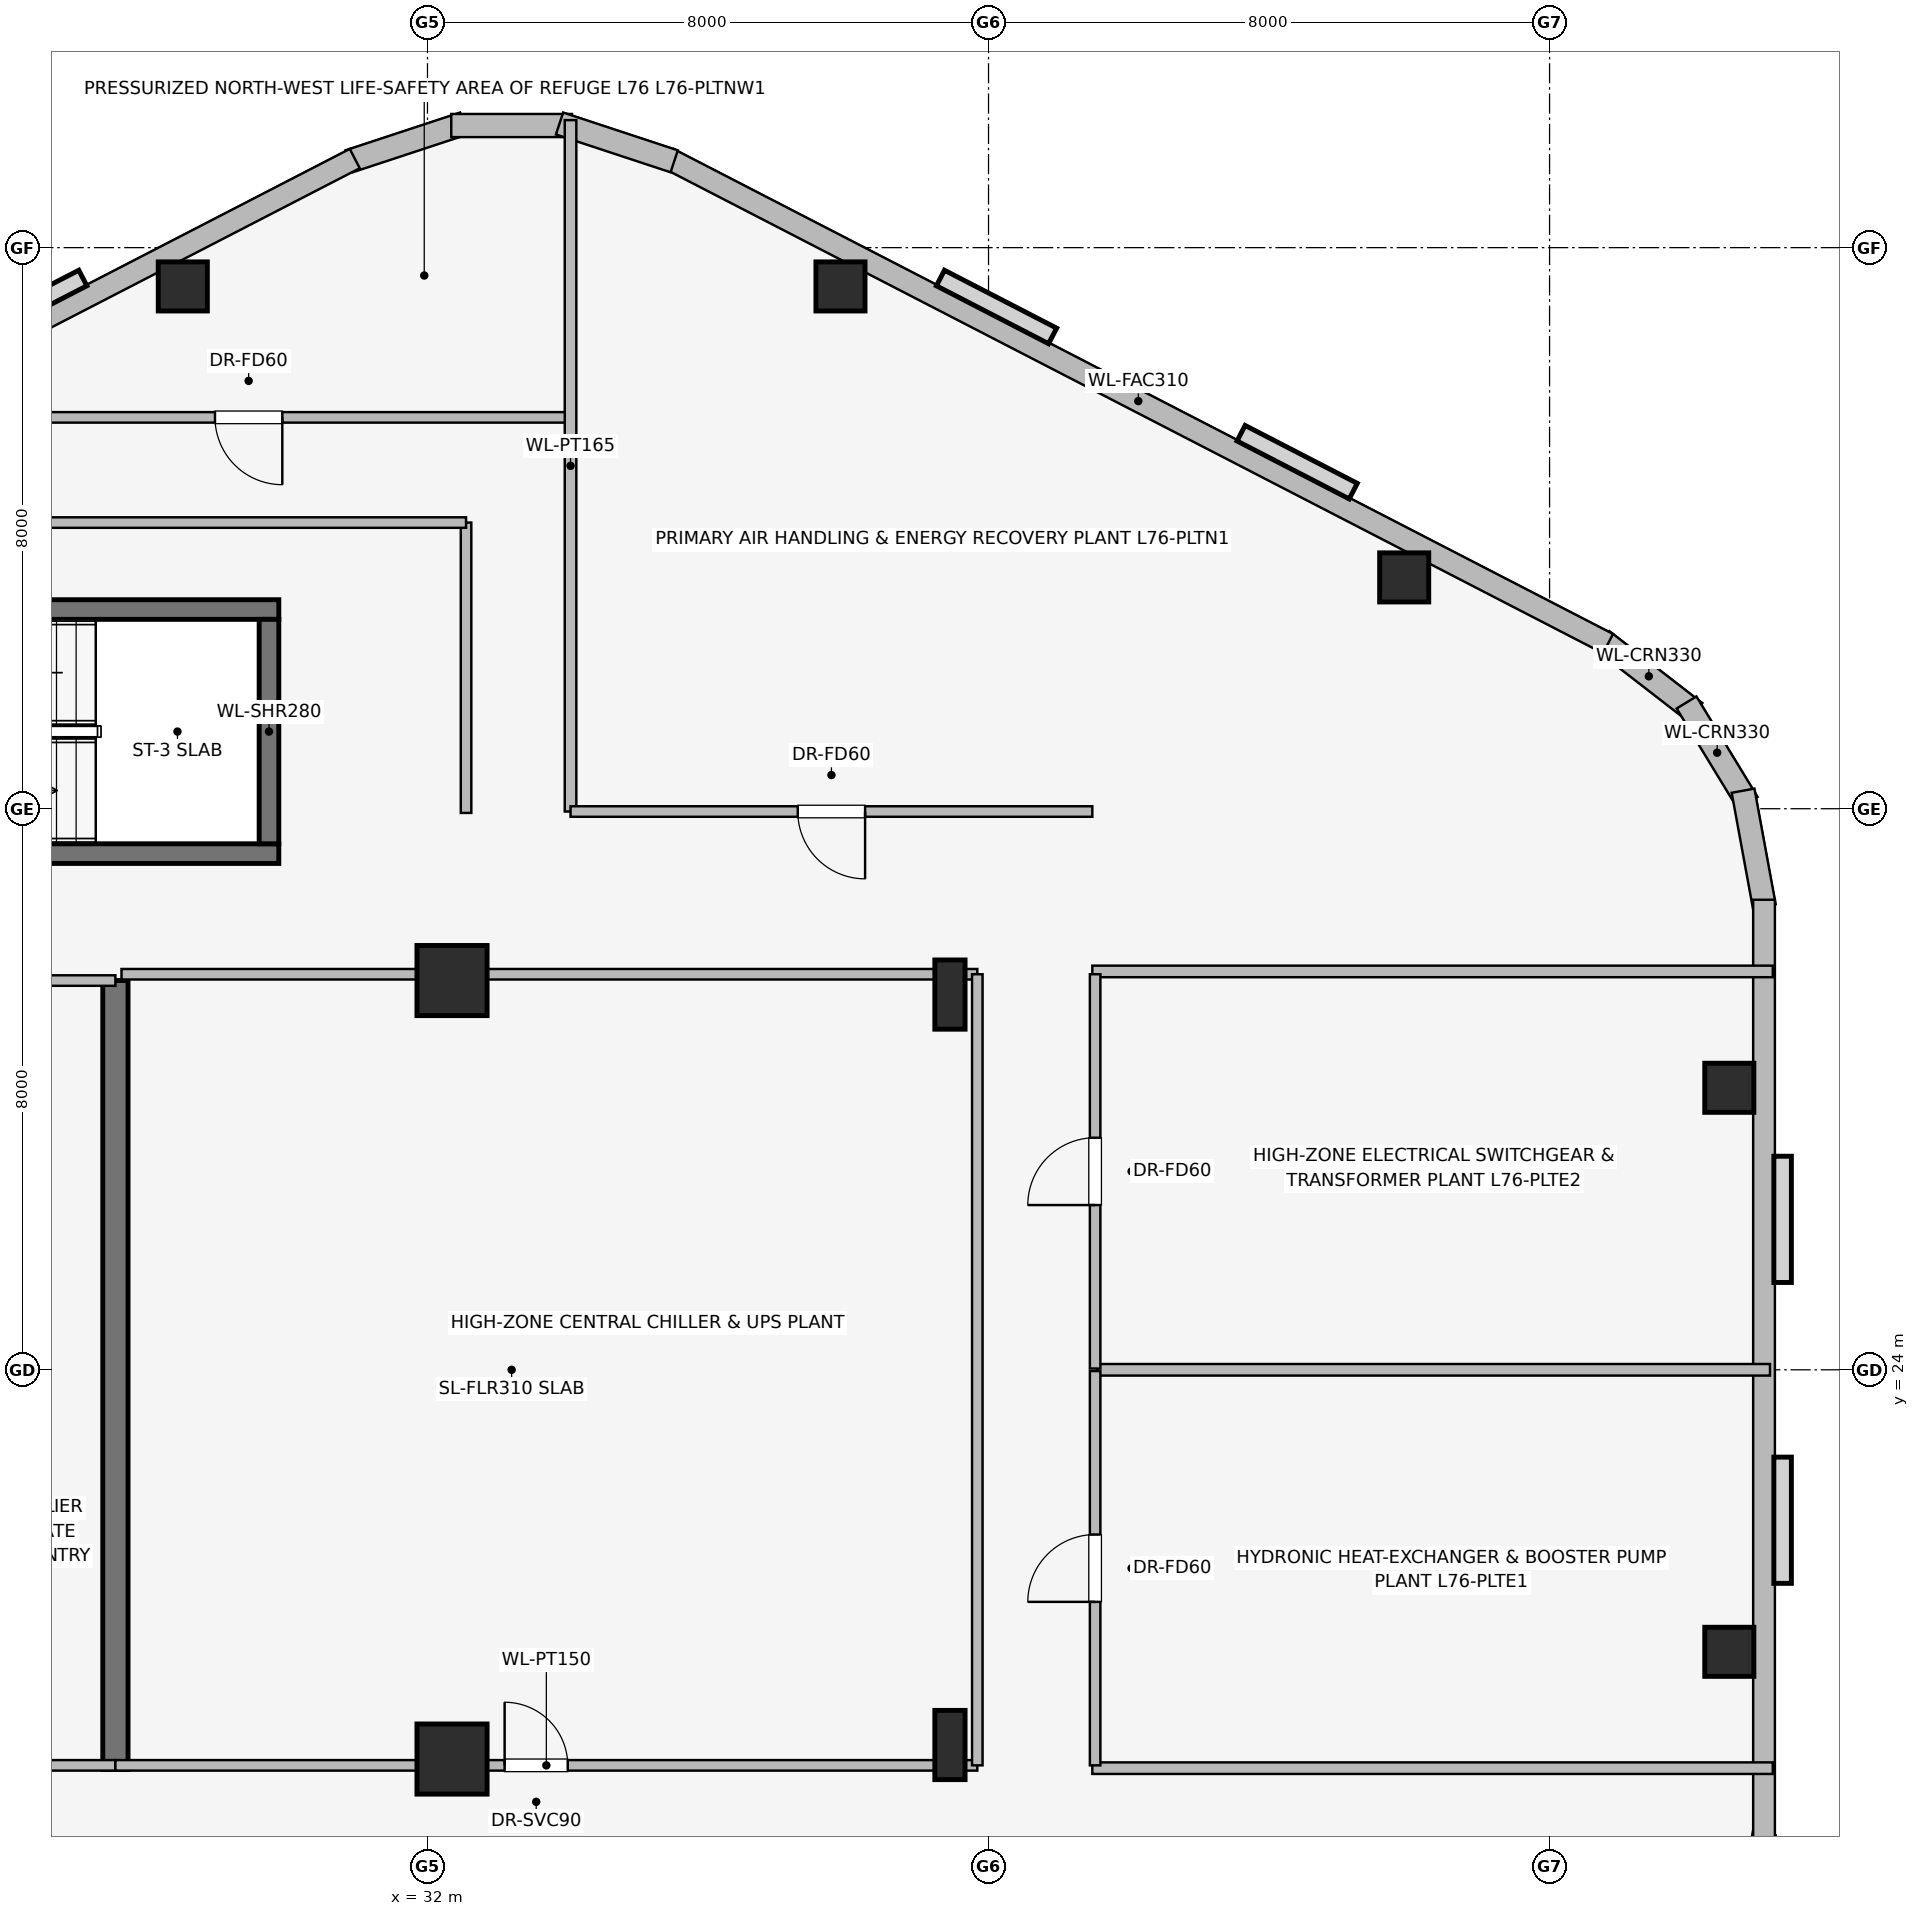
"""IFC4 building model, lengths in metres.
Left out: names, types, materials, properties, quantities, classifications, styles, units other than length and angle.
Written with IfcOpenShell. Run it as: python <this file> out.ifc"""

import sys

from ifc_helpers import new_model, si_unit, direction, frame, frame_2d, origin, origin_2d, place, context, subcontext, project, spatial, rectangle, i_section, extrude, element, fill, save


model = new_model("IFC4")
c1 = context("Model", 3, precision=1e-05, world=origin(), true_north=direction((0.0, 1.0)))
c2 = subcontext(c1, "Body", "Model", "MODEL_VIEW")
j1 = project(units=[si_unit("LENGTHUNIT", "METRE"), si_unit("PLANEANGLEUNIT", "RADIAN")], contexts=[c1])
p1 = place(None, origin())
s1 = spatial("IfcSite", under=j1, at=p1, CompositionType="ELEMENT")
p2 = place(p1, origin())
s2 = spatial("IfcBuilding", under=s1, at=p2, CompositionType="ELEMENT")
p3 = place(p2, frame((0.0, 0.0, 279.9)))
s3 = spatial("IfcBuildingStorey", under=s2, at=p3, CompositionType="ELEMENT", Elevation=279.9)
p4 = place(p3, frame((27.55, 29.55, 0.0), z_axis=(0.0, 0.0, 1.0), x_axis=(0.0, -1.0, 0.0)))
e1 = element("IfcWall", 1, at=p4, inside=s3, PredefinedType="SHEAR", context=c2, shape_type="SweptSolid", body=[
    extrude(rectangle(XDim=11.25, YDim=0.36, at=frame_2d((5.625, 0.0))), origin(), (0.0, 0.0, 1.0), 5.2),
])
p5 = place(p3, frame((21.52, 31.36, 0.0), z_axis=(0.0, 0.0, 1.0), x_axis=(1.0, 0.0, 0.0)))
e2 = element("IfcWall", 2, at=p5, inside=s3, PredefinedType="SHEAR", context=c2, shape_type="SweptSolid", body=[
    extrude(rectangle(XDim=8.36, YDim=0.28, at=frame_2d((4.18, 0.0))), origin(), (0.0, 0.0, 1.0), 5.2),
])
p6 = place(p5, frame((0.45, 0.0, 0.0)))
e3 = element("IfcOpeningElement", 3, at=p6, cuts=e2, PredefinedType="OPENING", context=c2, shape_type="SweptSolid", body=[
    extrude(rectangle(XDim=1.05, YDim=2.0, at=frame_2d((0.525, 1.0))), frame((0.0, 0.15, 0.0), z_axis=(0.0, -1.0, 0.0), x_axis=(1.0, 0.0, 0.0)), (0.0, 0.0, 1.0), 0.3),
])
p7 = place(p3, frame((29.88, 34.84, 0.0), z_axis=(0.0, 0.0, 1.0), x_axis=(-1.0, 0.0, 0.0)))
e4 = element("IfcWall", 4, at=p7, inside=s3, PredefinedType="SHEAR", context=c2, shape_type="SweptSolid", body=[
    extrude(rectangle(XDim=8.36, YDim=0.28, at=frame_2d((4.18, 0.0))), origin(), (0.0, 0.0, 1.0), 5.2),
])
p8 = place(p3, frame((29.74, 31.5, 0.0), z_axis=(0.0, 0.0, 1.0), x_axis=(0.0, 1.0, 0.0)))
e5 = element("IfcWall", 5, at=p8, inside=s3, PredefinedType="SHEAR", context=c2, shape_type="SweptSolid", body=[
    extrude(rectangle(XDim=3.2, YDim=0.28, at=frame_2d((1.6, 0.0))), origin(), (0.0, 0.0, 1.0), 5.2),
])
for number, where, z_axis, x_axis in (
    (6, (32.35, 18.45, 0.0), (0.0, 0.0, 1.0), (1.0, 0.0, 0.0)),
    (7, (32.35, 29.55, 0.0), (0.0, 0.0, 1.0), (1.0, 0.0, 0.0)),
):
    element("IfcColumn", number, at=place(p3, frame(where, z_axis=z_axis, x_axis=x_axis)), inside=s3, PredefinedType="COLUMN", context=c2, shape_type="SweptSolid", body=[
        extrude(rectangle(XDim=1.0, YDim=1.0, at=origin_2d()), origin(), (0.0, 0.0, 1.0), 5.2),
    ])
for number, where, z_axis, x_axis in (
    (8, (45.927, 35.298, 0.0), (0.0, 0.0, 1.0), (1.0, 0.0, 0.0)),
    (9, (37.889, 39.447, 0.0), (0.0, 0.0, 1.0), (1.0, 0.0, 0.0)),
    (10, (28.511, 39.447, 0.0), (0.0, 0.0, 1.0), (1.0, 0.0, 0.0)),
    (11, (50.563, 19.979, 0.0), (0.0, 0.0, 1.0), (1.0, 0.0, 0.0)),
    (12, (50.563, 28.021, 0.0), (0.0, 0.0, 1.0), (1.0, 0.0, 0.0)),
):
    element("IfcColumn", number, at=place(p3, frame(where, z_axis=z_axis, x_axis=x_axis)), inside=s3, PredefinedType="COLUMN", context=c2, shape_type="SweptSolid", body=[
        extrude(rectangle(XDim=0.7, YDim=0.7, at=origin_2d()), origin(), (0.0, 0.0, 1.0), 5.2),
    ])
for number, where, z_axis, x_axis in (
    (13, (39.45, 18.65, 0.0), (0.0, 0.0, 1.0), (1.0, 0.0, 0.0)),
    (14, (39.45, 29.35, 0.0), (0.0, 0.0, 1.0), (1.0, 0.0, 0.0)),
):
    element("IfcColumn", number, at=place(p3, frame(where, z_axis=z_axis, x_axis=x_axis)), inside=s3, PredefinedType="COLUMN", context=c2, shape_type="SweptSolid", body=[
        extrude(i_section(OverallWidth=0.431, OverallDepth=0.987, WebThickness=0.034, FlangeThickness=0.062, at=origin_2d()), origin(), (0.0, 0.0, 1.0), 5.2),
    ])
p9 = place(p3, frame((48.753, 34.401, 0.0), z_axis=(0.0, 0.0, 1.0), x_axis=(0.790691856293, -0.61221433207, 0.0)))
e15 = element("IfcWall", 15, at=p9, inside=s3, PredefinedType="STANDARD", context=c2, shape_type="SweptSolid", body=[
    extrude(rectangle(XDim=1.676, YDim=0.33, at=frame_2d((0.838, 0.0))), origin(), (0.0, 0.0, 1.0), 4.89),
])
p10 = place(p3, frame((49.953, 33.515, 0.0), z_axis=(0.0, 0.0, 1.0), x_axis=(0.520325409202, -0.853968072318, 0.0)))
e16 = element("IfcWall", 16, at=p10, inside=s3, PredefinedType="STANDARD", context=c2, shape_type="SweptSolid", body=[
    extrude(rectangle(XDim=1.678, YDim=0.33, at=frame_2d((0.839, 0.0))), origin(), (0.0, 0.0, 1.0), 4.89),
])
p11 = place(p3, frame((50.759, 32.257, 0.0), z_axis=(0.0, 0.0, 1.0), x_axis=(0.180691763044, -0.983539773862, 0.0)))
e17 = element("IfcWall", 17, at=p11, inside=s3, PredefinedType="STANDARD", context=c2, shape_type="SweptSolid", body=[
    extrude(rectangle(XDim=1.677, YDim=0.33, at=frame_2d((0.838, 0.0))), origin(), (0.0, 0.0, 1.0), 4.89),
])
p12 = place(p3, frame((35.437, 41.27, 0.0), z_axis=(0.0, 0.0, 1.0), x_axis=(0.888581481622, -0.458718814218, 0.0)))
e18 = element("IfcWall", 18, at=p12, inside=s3, PredefinedType="STANDARD", context=c2, shape_type="SweptSolid", body=[
    extrude(rectangle(XDim=15.077, YDim=0.31, at=frame_2d((7.539, 0.0))), origin(), (0.0, 0.0, 1.0), 4.89),
])
p13 = place(p3, frame((30.882, 41.231, 0.0), z_axis=(0.0, 0.0, 1.0), x_axis=(0.949713440491, 0.313120393699, 0.0)))
e19 = element("IfcWall", 19, at=p13, inside=s3, PredefinedType="STANDARD", context=c2, shape_type="SweptSolid", body=[
    extrude(rectangle(XDim=1.722, YDim=0.33, at=frame_2d((0.861, 0.0))), origin(), (0.0, 0.0, 1.0), 4.89),
])
p14 = place(p3, frame((32.339, 41.741, 0.0), z_axis=(0.0, 0.0, 1.0), x_axis=(1.0, 0.0, 0.0)))
e20 = element("IfcWall", 20, at=p14, inside=s3, PredefinedType="STANDARD", context=c2, shape_type="SweptSolid", body=[
    extrude(rectangle(XDim=1.722, YDim=0.33, at=frame_2d((0.861, 0.0))), origin(), (0.0, 0.0, 1.0), 4.89),
])
p15 = place(p3, frame((33.883, 41.77, 0.0), z_axis=(0.0, 0.0, 1.0), x_axis=(0.949713440491, -0.313120393699, 0.0)))
e21 = element("IfcWall", 21, at=p15, inside=s3, PredefinedType="STANDARD", context=c2, shape_type="SweptSolid", body=[
    extrude(rectangle(XDim=1.722, YDim=0.33, at=frame_2d((0.861, 0.0))), origin(), (0.0, 0.0, 1.0), 4.89),
])
p16 = place(p3, frame((17.566, 34.354, 0.0), z_axis=(0.0, 0.0, 1.0), x_axis=(0.888581481622, 0.458718814218, 0.0)))
e22 = element("IfcWall", 22, at=p16, inside=s3, PredefinedType="STANDARD", context=c2, shape_type="SweptSolid", body=[
    extrude(rectangle(XDim=15.077, YDim=0.31, at=frame_2d((7.539, 0.0))), origin(), (0.0, 0.0, 1.0), 4.89),
])
p17 = place(p3, frame((51.062, 17.392, 0.0), z_axis=(0.0, 0.0, 1.0), x_axis=(-0.180691763044, -0.983539773862, 0.0)))
e23 = element("IfcWall", 23, at=p17, inside=s3, PredefinedType="STANDARD", context=c2, shape_type="SweptSolid", body=[
    extrude(rectangle(XDim=1.677, YDim=0.33, at=frame_2d((0.838, 0.0))), origin(), (0.0, 0.0, 1.0), 4.89),
])
p18 = place(p3, frame((51.058, 30.702, 0.0), z_axis=(0.0, 0.0, 1.0), x_axis=(0.0, -1.0, 0.0)))
e24 = element("IfcWall", 24, at=p18, inside=s3, PredefinedType="STANDARD", context=c2, shape_type="SweptSolid", body=[
    extrude(rectangle(XDim=13.404, YDim=0.31, at=frame_2d((6.702, 0.0))), origin(), (0.0, 0.0, 1.0), 4.89),
])
p19 = place(p3, frame((25.32, 18.36, 0.0), z_axis=(0.0, 0.0, 1.0), x_axis=(1.0, 0.0, 0.0)))
e25 = element("IfcWall", 25, at=p19, inside=s3, PredefinedType="PARTITIONING", context=c2, shape_type="SweptSolid", body=[
    extrude(rectangle(XDim=2.23, YDim=0.15, at=frame_2d((1.115, 0.0))), origin(), (0.0, 0.0, 1.0), 4.89),
])
p20 = place(p3, frame((27.55, 29.55, 0.0), z_axis=(0.0, 0.0, 1.0), x_axis=(-1.0, 0.0, 0.0)))
e26 = element("IfcWall", 26, at=p20, inside=s3, PredefinedType="PARTITIONING", context=c2, shape_type="SweptSolid", body=[
    extrude(rectangle(XDim=2.23, YDim=0.15, at=frame_2d((1.115, 0.0))), origin(), (0.0, 0.0, 1.0), 3.79),
])
p21 = place(p3, frame((27.55, 18.36, 0.0), z_axis=(0.0, 0.0, 1.0), x_axis=(1.0, 0.0, 0.0)))
e27 = element("IfcWall", 27, at=p21, inside=s3, PredefinedType="PARTITIONING", context=c2, shape_type="SweptSolid", body=[
    extrude(rectangle(XDim=12.29, YDim=0.15, at=frame_2d((6.145, 0.0))), origin(), (0.0, 0.0, 1.0), 4.031),
])
p22 = place(p21, frame((5.55, 0.0, 0.0)))
e28 = element("IfcOpeningElement", 28, at=p22, cuts=e27, PredefinedType="OPENING", context=c2, shape_type="SweptSolid", body=[
    extrude(rectangle(XDim=0.9, YDim=2.0, at=frame_2d((0.45, 1.0))), frame((0.0, 0.085, 0.0), z_axis=(0.0, -1.0, 0.0), x_axis=(1.0, 0.0, 0.0)), (0.0, 0.0, 1.0), 0.17),
])
p23 = place(p3, frame((39.84, 29.64, 0.0), z_axis=(0.0, 0.0, 1.0), x_axis=(-1.0, 0.0, 0.0)))
e29 = element("IfcWall", 29, at=p23, inside=s3, PredefinedType="PARTITIONING", context=c2, shape_type="SweptSolid", body=[
    extrude(rectangle(XDim=12.203, YDim=0.15, at=frame_2d((6.102, 0.0))), origin(), (0.0, 0.0, 1.0), 4.031),
])
p24 = place(p3, frame((39.84, 18.36, 0.0), z_axis=(0.0, 0.0, 1.0), x_axis=(0.0, 1.0, 0.0)))
e30 = element("IfcWall", 30, at=p24, inside=s3, PredefinedType="PARTITIONING", context=c2, shape_type="SweptSolid", body=[
    extrude(rectangle(XDim=11.28, YDim=0.15, at=frame_2d((5.64, 0.0))), origin(), (0.0, 0.0, 1.0), 4.89),
])
p25 = place(p3, frame((34.0, 37.58, 0.0), z_axis=(0.0, 0.0, 1.0), x_axis=(-1.0, 0.0, 0.0)))
e31 = element("IfcWall", 31, at=p25, inside=s3, PredefinedType="PARTITIONING", context=c2, shape_type="SweptSolid", body=[
    extrude(rectangle(XDim=10.501, YDim=0.15, at=frame_2d((5.25, 0.0))), origin(), (0.0, 0.0, 1.0), 4.89),
])
p26 = place(p25, frame((4.07, 0.0, 0.0)))
e32 = element("IfcOpeningElement", 32, at=p26, cuts=e31, PredefinedType="OPENING", context=c2, shape_type="SweptSolid", body=[
    extrude(rectangle(XDim=0.96, YDim=2.0, at=frame_2d((0.48, 1.0))), frame((0.0, 0.085, 0.0), z_axis=(0.0, -1.0, 0.0), x_axis=(1.0, 0.0, 0.0)), (0.0, 0.0, 1.0), 0.17),
])
p27 = place(p3, frame((34.04, 31.96, 0.0), z_axis=(0.0, 0.0, 1.0), x_axis=(0.0, 1.0, 0.0)))
e33 = element("IfcWall", 33, at=p27, inside=s3, PredefinedType="PARTITIONING", context=c2, shape_type="SweptSolid", body=[
    extrude(rectangle(XDim=9.858, YDim=0.165, at=frame_2d((4.929, 0.0))), origin(), (0.0, 0.0, 1.0), 4.89),
])
p28 = place(p3, frame((41.48, 31.96, 0.0), z_axis=(0.0, 0.0, 1.0), x_axis=(-1.0, 0.0, 0.0)))
e34 = element("IfcWall", 34, at=p28, inside=s3, PredefinedType="PARTITIONING", context=c2, shape_type="SweptSolid", body=[
    extrude(rectangle(XDim=7.44, YDim=0.15, at=frame_2d((3.72, 0.0))), origin(), (0.0, 0.0, 1.0), 4.282),
])
p29 = place(p28, frame((3.24, 0.0, 0.0)))
e35 = element("IfcOpeningElement", 35, at=p29, cuts=e34, PredefinedType="OPENING", context=c2, shape_type="SweptSolid", body=[
    extrude(rectangle(XDim=0.96, YDim=2.0, at=frame_2d((0.48, 1.0))), frame((0.0, 0.085, 0.0), z_axis=(0.0, -1.0, 0.0), x_axis=(1.0, 0.0, 0.0)), (0.0, 0.0, 1.0), 0.17),
])
for number, where, z_axis, x_axis in (
    (36, (41.48, 18.32, 0.0), (0.0, 0.0, 1.0), (1.0, 0.0, 0.0)),
    (37, (41.48, 29.68, 0.0), (0.0, 0.0, 1.0), (1.0, 0.0, 0.0)),
):
    element("IfcWall", number, at=place(p3, frame(where, z_axis=z_axis, x_axis=x_axis)), inside=s3, PredefinedType="PARTITIONING", context=c2, shape_type="SweptSolid", body=[
        extrude(rectangle(XDim=9.703, YDim=0.165, at=frame_2d((4.852, 0.0))), origin(), (0.0, 0.0, 1.0), 4.89),
    ])
p30 = place(p3, frame((41.55, 24.0, 0.0), z_axis=(0.0, 0.0, 1.0), x_axis=(1.0, 0.0, 0.0)))
e38 = element("IfcWall", 38, at=p30, inside=s3, PredefinedType="PARTITIONING", context=c2, shape_type="SweptSolid", body=[
    extrude(rectangle(XDim=9.593, YDim=0.165, at=frame_2d((4.796, 0.0))), origin(), (0.0, 0.0, 1.0), 4.89),
])
p31 = place(p3, frame((41.52, 18.36, 0.0), z_axis=(0.0, 0.0, 1.0), x_axis=(0.0, 1.0, 0.0)))
e39 = element("IfcWall", 39, at=p31, inside=s3, PredefinedType="PARTITIONING", context=c2, shape_type="SweptSolid", body=[
    extrude(rectangle(XDim=5.622, YDim=0.15, at=frame_2d((2.811, 0.0))), origin(), (0.0, 0.0, 1.0), 4.89),
])
p32 = place(p31, frame((2.331, 0.0, 0.0)))
e40 = element("IfcOpeningElement", 40, at=p32, cuts=e39, PredefinedType="OPENING", context=c2, shape_type="SweptSolid", body=[
    extrude(rectangle(XDim=0.96, YDim=2.0, at=frame_2d((0.48, 1.0))), frame((0.0, 0.085, 0.0), z_axis=(0.0, -1.0, 0.0), x_axis=(1.0, 0.0, 0.0)), (0.0, 0.0, 1.0), 0.17),
])
p33 = place(p3, frame((41.52, 24.018, 0.0), z_axis=(0.0, 0.0, 1.0), x_axis=(0.0, 1.0, 0.0)))
e41 = element("IfcWall", 41, at=p33, inside=s3, PredefinedType="PARTITIONING", context=c2, shape_type="SweptSolid", body=[
    extrude(rectangle(XDim=5.622, YDim=0.15, at=frame_2d((2.811, 0.0))), origin(), (0.0, 0.0, 1.0), 4.89),
])
p34 = place(p33, frame((2.331, 0.0, 0.0)))
e42 = element("IfcOpeningElement", 42, at=p34, cuts=e41, PredefinedType="OPENING", context=c2, shape_type="SweptSolid", body=[
    extrude(rectangle(XDim=0.96, YDim=2.0, at=frame_2d((0.48, 1.0))), frame((0.0, 0.085, 0.0), z_axis=(0.0, -1.0, 0.0), x_axis=(1.0, 0.0, 0.0)), (0.0, 0.0, 1.0), 0.17),
])
p35 = place(p3, frame((32.55, 31.94, 0.0), z_axis=(0.0, 0.0, 1.0), x_axis=(0.0, 1.0, 0.0)))
e43 = element("IfcWall", 43, at=p35, inside=s3, PredefinedType="PARTITIONING", context=c2, shape_type="SweptSolid", body=[
    extrude(rectangle(XDim=4.14, YDim=0.15, at=frame_2d((2.07, 0.0))), origin(), (0.0, 0.0, 1.0), 4.89),
])
p36 = place(p3, frame((32.55, 36.08, 0.0), z_axis=(0.0, 0.0, 1.0), x_axis=(-1.0, 0.0, 0.0)))
e44 = element("IfcWall", 44, at=p36, inside=s3, PredefinedType="PARTITIONING", context=c2, shape_type="SweptSolid", body=[
    extrude(rectangle(XDim=10.15, YDim=0.15, at=frame_2d((5.075, 0.0))), origin(), (0.0, 0.0, 1.0), 4.89),
])
p37 = place(p22, origin())
e45 = element("IfcDoor", 45, at=p37, inside=s3, OperationType="SINGLE_SWING_LEFT", PredefinedType="DOOR", context=c2, shape_type="SweptSolid", body=[
    extrude(rectangle(XDim=0.9, YDim=2.0, at=frame_2d((0.45, 1.0))), frame((0.0, 0.025, 0.0), z_axis=(0.0, -1.0, 0.0), x_axis=(1.0, 0.0, 0.0)), (0.0, 0.0, 1.0), 0.05),
])
fill(e28, e45)
p38 = place(p26, origin())
e46 = element("IfcDoor", 46, at=p38, inside=s3, OperationType="SINGLE_SWING_LEFT", PredefinedType="DOOR", context=c2, shape_type="SweptSolid", body=[
    extrude(rectangle(XDim=0.96, YDim=2.0, at=frame_2d((0.48, 1.0))), frame((0.0, 0.025, 0.0), z_axis=(0.0, -1.0, 0.0), x_axis=(1.0, 0.0, 0.0)), (0.0, 0.0, 1.0), 0.05),
])
fill(e32, e46)
p39 = place(p29, origin())
e47 = element("IfcDoor", 47, at=p39, inside=s3, OperationType="SINGLE_SWING_LEFT", PredefinedType="DOOR", context=c2, shape_type="SweptSolid", body=[
    extrude(rectangle(XDim=0.96, YDim=2.0, at=frame_2d((0.48, 1.0))), frame((0.0, 0.025, 0.0), z_axis=(0.0, -1.0, 0.0), x_axis=(1.0, 0.0, 0.0)), (0.0, 0.0, 1.0), 0.05),
])
fill(e35, e47)
p40 = place(p32, origin())
e48 = element("IfcDoor", 48, at=p40, inside=s3, OperationType="SINGLE_SWING_LEFT", PredefinedType="DOOR", context=c2, shape_type="SweptSolid", body=[
    extrude(rectangle(XDim=0.96, YDim=2.0, at=frame_2d((0.48, 1.0))), frame((0.0, 0.025, 0.0), z_axis=(0.0, -1.0, 0.0), x_axis=(1.0, 0.0, 0.0)), (0.0, 0.0, 1.0), 0.05),
])
fill(e40, e48)
p41 = place(p34, origin())
e49 = element("IfcDoor", 49, at=p41, inside=s3, OperationType="SINGLE_SWING_LEFT", PredefinedType="DOOR", context=c2, shape_type="SweptSolid", body=[
    extrude(rectangle(XDim=0.96, YDim=2.0, at=frame_2d((0.48, 1.0))), frame((0.0, 0.025, 0.0), z_axis=(0.0, -1.0, 0.0), x_axis=(1.0, 0.0, 0.0)), (0.0, 0.0, 1.0), 0.05),
])
fill(e42, e49)
save(model, sys.argv[1])
